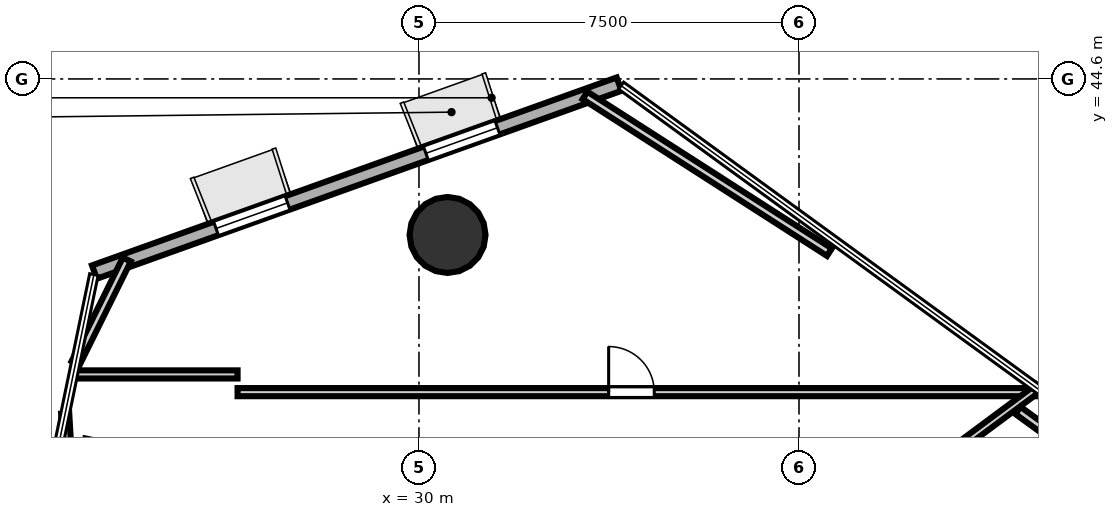
"""IFC4 building model, lengths in metres.
Left out: names, types, materials, properties, quantities, classifications, styles, units other than length and angle.
Written with IfcOpenShell. Run it as: python <this file> out.ifc"""

import sys

from ifc_helpers import new_model, si_unit, direction, frame, frame_2d, origin, origin_2d, place, context, subcontext, project, spatial, rectangle, hollow_circle, extrude, element, fill, save


model = new_model("IFC4")
c1 = context("Model", 3, precision=1e-05, world=origin(), true_north=direction((0.0, 1.0)))
c2 = subcontext(c1, "Body", "Model", "MODEL_VIEW")
j1 = project(units=[si_unit("LENGTHUNIT", "METRE"), si_unit("PLANEANGLEUNIT", "RADIAN")], contexts=[c1])
p1 = place(None, origin())
s1 = spatial("IfcSite", under=j1, at=p1, CompositionType="ELEMENT")
p2 = place(p1, origin())
s2 = spatial("IfcBuilding", under=s1, at=p2, CompositionType="ELEMENT")
p3 = place(p2, frame((0.0, 0.0, 97.8)))
s3 = spatial("IfcBuildingStorey", under=s2, at=p3, CompositionType="ELEMENT", Elevation=97.8)
p4 = place(p3, frame((30.564, 41.521, -0.23), z_axis=(0.0, 0.0, 1.0), x_axis=(1.0, 0.0, 0.0)))
e1 = element("IfcColumn", 1, at=p4, inside=s3, PredefinedType="COLUMN", context=c2, shape_type="SweptSolid", body=[
    extrude(hollow_circle(Radius=0.75, WallThickness=0.036, at=origin_2d()), origin(), (0.0, 0.0, 1.0), 3.93),
])
p5 = place(p3, frame((33.949, 44.497, 0.0), z_axis=(0.0, 0.0, 1.0), x_axis=(-0.941433163769, -0.337199641394, 0.0)))
e2 = element("IfcWall", 2, at=p5, inside=s3, PredefinedType="SOLIDWALL", context=c2, shape_type="SweptSolid", body=[
    extrude(rectangle(XDim=10.999, YDim=0.28, at=frame_2d((5.499, 0.0))), origin(), (0.0, 0.0, 1.0), 3.52),
])
p6 = place(p5, frame((2.55, 0.0, 0.85)))
e3 = element("IfcOpeningElement", 3, at=p6, cuts=e2, PredefinedType="OPENING", context=c2, shape_type="SweptSolid", body=[
    extrude(rectangle(XDim=1.5, YDim=2.1, at=frame_2d((0.75, 1.05))), frame((0.0, 0.15, 0.0), z_axis=(0.0, -1.0, 0.0), x_axis=(1.0, 0.0, 0.0)), (0.0, 0.0, 1.0), 0.3),
])
p7 = place(p5, frame((6.949, 0.0, 0.85)))
e4 = element("IfcOpeningElement", 4, at=p7, cuts=e2, PredefinedType="OPENING", context=c2, shape_type="SweptSolid", body=[
    extrude(rectangle(XDim=1.5, YDim=2.1, at=frame_2d((0.75, 1.05))), frame((0.0, 0.15, 0.0), z_axis=(0.0, -1.0, 0.0), x_axis=(1.0, 0.0, 0.0)), (0.0, 0.0, 1.0), 0.3),
])
p8 = place(p3, frame((39.88, 36.619, 0.0), z_axis=(0.0, 0.0, 1.0), x_axis=(0.969604227455, 0.244678650687, 0.0)))
e5 = element("IfcWall", 5, at=p8, inside=s3, PredefinedType="PARTITIONING", context=c2, shape_type="SweptSolid", body=[
    extrude(rectangle(XDim=3.752, YDim=0.16, at=frame_2d((1.876, 0.0))), origin(), (0.0, 0.0, 1.0), 2.84),
])
p9 = place(p3, frame((23.157, 38.769, 0.0), z_axis=(0.0, 0.0, 1.0), x_axis=(1.0, 0.0, 0.0)))
e6 = element("IfcWall", 6, at=p9, inside=s3, PredefinedType="PARTITIONING", context=c2, shape_type="SweptSolid", body=[
    extrude(rectangle(XDim=3.263, YDim=0.16, at=frame_2d((1.631, 0.0))), origin(), (0.0, 0.0, 1.0), 2.84),
])
p10 = place(p3, frame((26.42, 38.419, 0.0), z_axis=(0.0, 0.0, 1.0), x_axis=(1.0, 0.0, 0.0)))
e7 = element("IfcWall", 7, at=p10, inside=s3, PredefinedType="PARTITIONING", context=c2, shape_type="SweptSolid", body=[
    extrude(rectangle(XDim=15.905, YDim=0.16, at=frame_2d((7.953, 0.0))), origin(), (0.0, 0.0, 1.0), 2.84),
])
p11 = place(p10, frame((7.323, 0.0, 0.0)))
e8 = element("IfcOpeningElement", 8, at=p11, cuts=e7, PredefinedType="OPENING", context=c2, shape_type="SweptSolid", body=[
    extrude(rectangle(XDim=0.9, YDim=2.1, at=frame_2d((0.45, 1.05))), frame((0.0, 0.09, 0.0), z_axis=(0.0, -1.0, 0.0), x_axis=(1.0, 0.0, 0.0)), (0.0, 0.0, 1.0), 0.18),
])
p12 = place(p3, frame((42.222, 38.503, 0.0), z_axis=(0.0, 0.0, 1.0), x_axis=(-0.80276499598, -0.596295531787, 0.0)))
e9 = element("IfcWall", 9, at=p12, inside=s3, PredefinedType="PARTITIONING", context=c2, shape_type="SweptSolid", body=[
    extrude(rectangle(XDim=3.0, YDim=0.16, at=frame_2d((1.5, 0.0))), origin(), (0.0, 0.0, 1.0), 2.84),
])
p13 = place(p3, frame((23.223, 38.99, 0.0), z_axis=(0.0, 0.0, 1.0), x_axis=(0.443099956325, 0.896472213013, 0.0)))
e10 = element("IfcWall", 10, at=p13, inside=s3, PredefinedType="PLUMBINGWALL", context=c2, shape_type="SweptSolid", body=[
    extrude(rectangle(XDim=2.282, YDim=0.175, at=frame_2d((1.141, 0.0))), origin(), (0.0, 0.0, 1.0), 2.84),
])
p14 = place(p3, frame((33.277, 44.274, 0.0), z_axis=(0.0, 0.0, 1.0), x_axis=(0.841777372598, -0.539824837314, 0.0)))
e11 = element("IfcWall", 11, at=p14, inside=s3, PredefinedType="PLUMBINGWALL", context=c2, shape_type="SweptSolid", body=[
    extrude(rectangle(XDim=5.73, YDim=0.175, at=frame_2d((2.865, 0.0))), origin(), (0.0, 0.0, 1.0), 2.84),
])
p15 = place(p3, frame((41.82, 38.059, 0.0), z_axis=(0.0, 0.0, 1.0), x_axis=(0.808676260011, -0.588253947284, 0.0)))
e12 = element("IfcWall", 12, at=p15, inside=s3, PredefinedType="PLUMBINGWALL", context=c2, shape_type="SweptSolid", body=[
    extrude(rectangle(XDim=16.06, YDim=0.175, at=frame_2d((8.03, 0.0))), origin(), (0.0, 0.0, 1.0), 2.84),
])
p16 = place(p3, frame((23.108, 36.442, 0.0), z_axis=(0.0, 0.0, 1.0), x_axis=(-0.057959830366, 0.99831891601, 0.0)))
e13 = element("IfcWall", 13, at=p16, inside=s3, PredefinedType="PARTITIONING", context=c2, shape_type="SweptSolid", body=[
    extrude(rectangle(XDim=1.559, YDim=0.16, at=frame_2d((0.779, 0.0))), origin(), (0.0, 0.0, 1.0), 2.84),
])
p17 = place(p11, origin())
e14 = element("IfcDoor", 14, at=p17, inside=s3, OperationType="SINGLE_SWING_LEFT", PredefinedType="DOOR", context=c2, shape_type="SweptSolid", body=[
    extrude(rectangle(XDim=0.9, YDim=2.1, at=frame_2d((0.45, 1.05))), frame((0.0, 0.025, 0.0), z_axis=(0.0, -1.0, 0.0), x_axis=(1.0, 0.0, 0.0)), (0.0, 0.0, 1.0), 0.05),
])
fill(e8, e14)
p18 = place(p6, origin())
e15 = element("IfcWindow", 15, at=p18, inside=s3, PartitioningType="SINGLE_PANEL", PredefinedType="WINDOW", context=c2, shape_type="SweptSolid", body=[
    extrude(rectangle(XDim=1.5, YDim=2.1, at=frame_2d((0.75, 1.05))), frame((0.0, 0.03, 0.0), z_axis=(0.0, -1.0, 0.0), x_axis=(1.0, 0.0, 0.0)), (0.0, 0.0, 1.0), 0.06),
])
fill(e3, e15)
p19 = place(p7, origin())
e16 = element("IfcWindow", 16, at=p19, inside=s3, PartitioningType="SINGLE_PANEL", PredefinedType="WINDOW", context=c2, shape_type="SweptSolid", body=[
    extrude(rectangle(XDim=1.5, YDim=2.1, at=frame_2d((0.75, 1.05))), frame((0.0, 0.03, 0.0), z_axis=(0.0, -1.0, 0.0), x_axis=(1.0, 0.0, 0.0)), (0.0, 0.0, 1.0), 0.06),
])
fill(e4, e16)
save(model, sys.argv[1])
